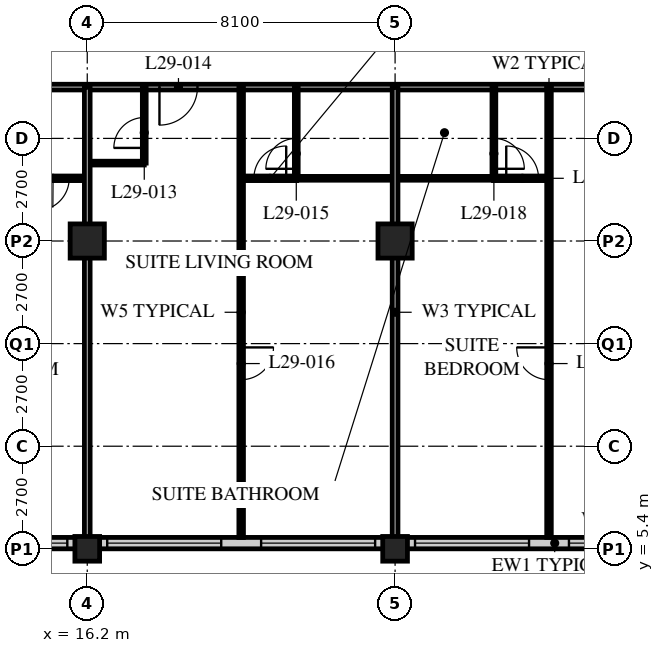
"""IFC4 building model, lengths in metres.
Left out: names, types, materials, properties, quantities, classifications, styles, units other than length and angle.
Written with IfcOpenShell. Run it as: python <this file> out.ifc"""

import sys

from ifc_helpers import new_model, si_unit, direction, frame, frame_2d, origin, origin_2d, place, context, subcontext, project, spatial, rectangle, hollow_rectangle, extrude, element, fill, save


model = new_model("IFC4")
c1 = context("Model", 3, precision=1e-05, world=origin(), true_north=direction((0.0, 1.0)))
c2 = subcontext(c1, "Body", "Model", "MODEL_VIEW")
j1 = project(units=[si_unit("LENGTHUNIT", "METRE"), si_unit("PLANEANGLEUNIT", "RADIAN")], contexts=[c1])
p1 = place(None, origin())
s1 = spatial("IfcSite", under=j1, at=p1, CompositionType="ELEMENT")
p2 = place(p1, origin())
s2 = spatial("IfcBuilding", under=s1, at=p2, CompositionType="ELEMENT")
p3 = place(p2, frame((0.0, 0.0, 117.0)))
s3 = spatial("IfcBuildingStorey", under=s2, at=p3, CompositionType="ELEMENT", Elevation=117.0)
p4 = place(p3, frame((16.2, 5.4, 0.0), z_axis=(0.0, 0.0, 1.0), x_axis=(1.0, 0.0, 0.0)))
e1 = element("IfcColumn", 1, at=p4, inside=s3, PredefinedType="COLUMN", context=c2, shape_type="SweptSolid", body=[
    extrude(hollow_rectangle(XDim=0.65, YDim=0.65, WallThickness=0.055, at=origin_2d()), origin(), (0.0, 0.0, 1.0), 3.4),
])
p5 = place(p3, frame((16.2, 13.5, 0.0), z_axis=(0.0, 0.0, 1.0), x_axis=(1.0, 0.0, 0.0)))
e2 = element("IfcColumn", 2, at=p5, inside=s3, PredefinedType="COLUMN", context=c2, shape_type="SweptSolid", body=[
    extrude(hollow_rectangle(XDim=0.9, YDim=0.9, WallThickness=0.09, at=origin_2d()), origin(), (0.0, 0.0, 1.0), 3.4),
])
p6 = place(p3, frame((24.3, 5.4, 0.0), z_axis=(0.0, 0.0, 1.0), x_axis=(1.0, 0.0, 0.0)))
e3 = element("IfcColumn", 3, at=p6, inside=s3, PredefinedType="COLUMN", context=c2, shape_type="SweptSolid", body=[
    extrude(hollow_rectangle(XDim=0.65, YDim=0.65, WallThickness=0.055, at=origin_2d()), origin(), (0.0, 0.0, 1.0), 3.4),
])
p7 = place(p3, frame((24.3, 13.5, 0.0), z_axis=(0.0, 0.0, 1.0), x_axis=(1.0, 0.0, 0.0)))
e4 = element("IfcColumn", 4, at=p7, inside=s3, PredefinedType="COLUMN", context=c2, shape_type="SweptSolid", body=[
    extrude(hollow_rectangle(XDim=0.9, YDim=0.9, WallThickness=0.09, at=origin_2d()), origin(), (0.0, 0.0, 1.0), 3.4),
])
p8 = place(p3, frame((8.4, 5.55, 0.0), z_axis=(0.0, 0.0, 1.0), x_axis=(1.0, 0.0, 0.0)))
e5 = element("IfcWall", 5, at=p8, inside=s3, PredefinedType="SOLIDWALL", context=c2, shape_type="SweptSolid", body=[
    extrude(rectangle(XDim=40.2, YDim=0.3, at=frame_2d((20.1, 0.0))), origin(), (0.0, 0.0, 1.0), 3.19),
])
p9 = place(p8, frame((0.225, 0.0, 0.9)))
e6 = element("IfcOpeningElement", 6, at=p9, cuts=e5, PredefinedType="OPENING", context=c2, shape_type="SweptSolid", body=[
    extrude(rectangle(XDim=3.0, YDim=2.0, at=frame_2d((1.5, 1.0))), frame((0.0, 0.16, 0.0), z_axis=(0.0, -1.0, 0.0), x_axis=(1.0, 0.0, 0.0)), (0.0, 0.0, 1.0), 0.32),
])
p10 = place(p8, frame((4.275, 0.0, 0.9)))
e7 = element("IfcOpeningElement", 7, at=p10, cuts=e5, PredefinedType="OPENING", context=c2, shape_type="SweptSolid", body=[
    extrude(rectangle(XDim=3.0, YDim=2.0, at=frame_2d((1.5, 1.0))), frame((0.0, 0.16, 0.0), z_axis=(0.0, -1.0, 0.0), x_axis=(1.0, 0.0, 0.0)), (0.0, 0.0, 1.0), 0.32),
])
p11 = place(p8, frame((8.325, 0.0, 0.9)))
e8 = element("IfcOpeningElement", 8, at=p11, cuts=e5, PredefinedType="OPENING", context=c2, shape_type="SweptSolid", body=[
    extrude(rectangle(XDim=3.0, YDim=2.0, at=frame_2d((1.5, 1.0))), frame((0.0, 0.16, 0.0), z_axis=(0.0, -1.0, 0.0), x_axis=(1.0, 0.0, 0.0)), (0.0, 0.0, 1.0), 0.32),
])
p12 = place(p8, frame((12.375, 0.0, 0.9)))
e9 = element("IfcOpeningElement", 9, at=p12, cuts=e5, PredefinedType="OPENING", context=c2, shape_type="SweptSolid", body=[
    extrude(rectangle(XDim=3.0, YDim=2.0, at=frame_2d((1.5, 1.0))), frame((0.0, 0.16, 0.0), z_axis=(0.0, -1.0, 0.0), x_axis=(1.0, 0.0, 0.0)), (0.0, 0.0, 1.0), 0.32),
])
p13 = place(p8, frame((16.425, 0.0, 0.9)))
e10 = element("IfcOpeningElement", 10, at=p13, cuts=e5, PredefinedType="OPENING", context=c2, shape_type="SweptSolid", body=[
    extrude(rectangle(XDim=3.0, YDim=2.0, at=frame_2d((1.5, 1.0))), frame((0.0, 0.16, 0.0), z_axis=(0.0, -1.0, 0.0), x_axis=(1.0, 0.0, 0.0)), (0.0, 0.0, 1.0), 0.32),
])
p14 = place(p8, frame((20.475, 0.0, 0.9)))
e11 = element("IfcOpeningElement", 11, at=p14, cuts=e5, PredefinedType="OPENING", context=c2, shape_type="SweptSolid", body=[
    extrude(rectangle(XDim=3.0, YDim=2.0, at=frame_2d((1.5, 1.0))), frame((0.0, 0.16, 0.0), z_axis=(0.0, -1.0, 0.0), x_axis=(1.0, 0.0, 0.0)), (0.0, 0.0, 1.0), 0.32),
])
p15 = place(p8, frame((24.525, 0.0, 0.9)))
e12 = element("IfcOpeningElement", 12, at=p15, cuts=e5, PredefinedType="OPENING", context=c2, shape_type="SweptSolid", body=[
    extrude(rectangle(XDim=3.0, YDim=2.0, at=frame_2d((1.5, 1.0))), frame((0.0, 0.16, 0.0), z_axis=(0.0, -1.0, 0.0), x_axis=(1.0, 0.0, 0.0)), (0.0, 0.0, 1.0), 0.32),
])
p16 = place(p8, frame((28.575, 0.0, 0.9)))
e13 = element("IfcOpeningElement", 13, at=p16, cuts=e5, PredefinedType="OPENING", context=c2, shape_type="SweptSolid", body=[
    extrude(rectangle(XDim=3.0, YDim=2.0, at=frame_2d((1.5, 1.0))), frame((0.0, 0.16, 0.0), z_axis=(0.0, -1.0, 0.0), x_axis=(1.0, 0.0, 0.0)), (0.0, 0.0, 1.0), 0.32),
])
p17 = place(p8, frame((32.625, 0.0, 0.9)))
e14 = element("IfcOpeningElement", 14, at=p17, cuts=e5, PredefinedType="OPENING", context=c2, shape_type="SweptSolid", body=[
    extrude(rectangle(XDim=3.0, YDim=2.0, at=frame_2d((1.5, 1.0))), frame((0.0, 0.16, 0.0), z_axis=(0.0, -1.0, 0.0), x_axis=(1.0, 0.0, 0.0)), (0.0, 0.0, 1.0), 0.32),
])
p18 = place(p8, frame((36.675, 0.0, 0.9)))
e15 = element("IfcOpeningElement", 15, at=p18, cuts=e5, PredefinedType="OPENING", context=c2, shape_type="SweptSolid", body=[
    extrude(rectangle(XDim=3.0, YDim=2.0, at=frame_2d((1.5, 1.0))), frame((0.0, 0.16, 0.0), z_axis=(0.0, -1.0, 0.0), x_axis=(1.0, 0.0, 0.0)), (0.0, 0.0, 1.0), 0.32),
])
p19 = place(p3, frame((12.15, 17.55, 0.0), z_axis=(0.0, 0.0, 1.0), x_axis=(1.0, 0.0, 0.0)))
e16 = element("IfcWall", 16, at=p19, inside=s3, PredefinedType="PARTITIONING", context=c2, shape_type="SweptSolid", body=[
    extrude(rectangle(XDim=32.4, YDim=0.15, at=frame_2d((16.2, 0.0))), origin(), (0.0, 0.0, 1.0), 3.19),
])
p20 = place(p19, frame((5.95, 0.0, 0.0)))
e17 = element("IfcOpeningElement", 17, at=p20, cuts=e16, PredefinedType="OPENING", context=c2, shape_type="SweptSolid", body=[
    extrude(rectangle(XDim=1.0, YDim=2.1, at=frame_2d((0.5, 1.05))), frame((0.0, 0.085, 0.0), z_axis=(0.0, -1.0, 0.0), x_axis=(1.0, 0.0, 0.0)), (0.0, 0.0, 1.0), 0.17),
])
p21 = place(p19, frame((17.725, 0.0, 0.0)))
e18 = element("IfcOpeningElement", 18, at=p21, cuts=e16, PredefinedType="OPENING", context=c2, shape_type="SweptSolid", body=[
    extrude(rectangle(XDim=1.0, YDim=2.1, at=frame_2d((0.5, 1.05))), frame((0.0, 0.085, 0.0), z_axis=(0.0, -1.0, 0.0), x_axis=(1.0, 0.0, 0.0)), (0.0, 0.0, 1.0), 0.17),
])
p22 = place(p19, frame((26.75, 0.0, 0.0)))
e19 = element("IfcOpeningElement", 19, at=p22, cuts=e16, PredefinedType="OPENING", context=c2, shape_type="SweptSolid", body=[
    extrude(rectangle(XDim=1.0, YDim=2.1, at=frame_2d((0.5, 1.05))), frame((0.0, 0.085, 0.0), z_axis=(0.0, -1.0, 0.0), x_axis=(1.0, 0.0, 0.0)), (0.0, 0.0, 1.0), 0.17),
])
p23 = place(p19, frame((1.525, 0.0, 0.0)))
e20 = element("IfcOpeningElement", 20, at=p23, cuts=e16, PredefinedType="OPENING", context=c2, shape_type="SweptSolid", body=[
    extrude(rectangle(XDim=1.0, YDim=2.1, at=frame_2d((0.5, 1.05))), frame((0.0, 0.085, 0.0), z_axis=(0.0, -1.0, 0.0), x_axis=(1.0, 0.0, 0.0)), (0.0, 0.0, 1.0), 0.17),
])
p24 = place(p19, frame((29.875, 0.0, 0.0)))
e21 = element("IfcOpeningElement", 21, at=p24, cuts=e16, PredefinedType="OPENING", context=c2, shape_type="SweptSolid", body=[
    extrude(rectangle(XDim=1.0, YDim=2.1, at=frame_2d((0.5, 1.05))), frame((0.0, 0.085, 0.0), z_axis=(0.0, -1.0, 0.0), x_axis=(1.0, 0.0, 0.0)), (0.0, 0.0, 1.0), 0.17),
])
p25 = place(p3, frame((16.2, 15.55, 0.0), z_axis=(0.0, 0.0, 1.0), x_axis=(1.0, 0.0, 0.0)))
e22 = element("IfcWall", 22, at=p25, inside=s3, PredefinedType="PARTITIONING", context=c2, shape_type="SweptSolid", body=[
    extrude(rectangle(XDim=1.5, YDim=0.1, at=frame_2d((0.75, 0.0))), origin(), (0.0, 0.0, 1.0), 3.19),
])
p26 = place(p3, frame((17.7, 17.55, 0.0), z_axis=(0.0, 0.0, 1.0), x_axis=(0.0, -1.0, 0.0)))
e23 = element("IfcWall", 23, at=p26, inside=s3, PredefinedType="PARTITIONING", context=c2, shape_type="SweptSolid", body=[
    extrude(rectangle(XDim=2.0, YDim=0.1, at=frame_2d((1.0, 0.0))), origin(), (0.0, 0.0, 1.0), 3.19),
])
p27 = place(p26, frame((0.8, 0.0, 0.0)))
e24 = element("IfcOpeningElement", 24, at=p27, cuts=e23, PredefinedType="OPENING", context=c2, shape_type="SweptSolid", body=[
    extrude(rectangle(XDim=0.8, YDim=2.1, at=frame_2d((0.4, 1.05))), frame((0.0, 0.06, 0.0), z_axis=(0.0, -1.0, 0.0), x_axis=(1.0, 0.0, 0.0)), (0.0, 0.0, 1.0), 0.12),
])
p28 = place(p3, frame((21.7, 15.15, 0.0), z_axis=(0.0, 0.0, 1.0), x_axis=(1.0, 0.0, 0.0)))
e25 = element("IfcWall", 25, at=p28, inside=s3, PredefinedType="PARTITIONING", context=c2, shape_type="SweptSolid", body=[
    extrude(rectangle(XDim=5.2, YDim=0.1, at=frame_2d((2.6, 0.0))), origin(), (0.0, 0.0, 1.0), 3.19),
])
p29 = place(p3, frame((21.7, 17.55, 0.0), z_axis=(0.0, 0.0, 1.0), x_axis=(0.0, -1.0, 0.0)))
e26 = element("IfcWall", 26, at=p29, inside=s3, PredefinedType="PARTITIONING", context=c2, shape_type="SweptSolid", body=[
    extrude(rectangle(XDim=2.4, YDim=0.1, at=frame_2d((1.2, 0.0))), origin(), (0.0, 0.0, 1.0), 3.19),
])
p30 = place(p29, frame((1.35, 0.0, 0.0)))
e27 = element("IfcOpeningElement", 27, at=p30, cuts=e26, PredefinedType="OPENING", context=c2, shape_type="SweptSolid", body=[
    extrude(rectangle(XDim=0.8, YDim=2.1, at=frame_2d((0.4, 1.05))), frame((0.0, 0.06, 0.0), z_axis=(0.0, -1.0, 0.0), x_axis=(1.0, 0.0, 0.0)), (0.0, 0.0, 1.0), 0.12),
])
p31 = place(p3, frame((20.25, 17.55, 0.0), z_axis=(0.0, 0.0, 1.0), x_axis=(0.0, -1.0, 0.0)))
e28 = element("IfcWall", 28, at=p31, inside=s3, PredefinedType="PARTITIONING", context=c2, shape_type="SweptSolid", body=[
    extrude(rectangle(XDim=11.85, YDim=0.12, at=frame_2d((5.925, 0.0))), origin(), (0.0, 0.0, 1.0), 3.19),
])
p32 = place(p31, frame((6.85, 0.0, 0.0)))
e29 = element("IfcOpeningElement", 29, at=p32, cuts=e28, PredefinedType="OPENING", context=c2, shape_type="SweptSolid", body=[
    extrude(rectangle(XDim=0.85, YDim=2.1, at=frame_2d((0.425, 1.05))), frame((0.0, 0.07, 0.0), z_axis=(0.0, -1.0, 0.0), x_axis=(1.0, 0.0, 0.0)), (0.0, 0.0, 1.0), 0.14),
])
p33 = place(p3, frame((24.3, 17.55, 0.0), z_axis=(0.0, 0.0, 1.0), x_axis=(0.0, -1.0, 0.0)))
e30 = element("IfcWall", 30, at=p33, inside=s3, PredefinedType="PARTITIONING", context=c2, shape_type="SweptSolid", body=[
    extrude(rectangle(XDim=11.85, YDim=0.15, at=frame_2d((5.925, 0.0))), origin(), (0.0, 0.0, 1.0), 2.578),
])
p34 = place(p3, frame((26.9, 17.55, 0.0), z_axis=(0.0, 0.0, 1.0), x_axis=(0.0, -1.0, 0.0)))
e31 = element("IfcWall", 31, at=p34, inside=s3, PredefinedType="PARTITIONING", context=c2, shape_type="SweptSolid", body=[
    extrude(rectangle(XDim=2.4, YDim=0.1, at=frame_2d((1.2, 0.0))), origin(), (0.0, 0.0, 1.0), 3.19),
])
p35 = place(p34, frame((1.35, 0.0, 0.0)))
e32 = element("IfcOpeningElement", 32, at=p35, cuts=e31, PredefinedType="OPENING", context=c2, shape_type="SweptSolid", body=[
    extrude(rectangle(XDim=0.8, YDim=2.1, at=frame_2d((0.4, 1.05))), frame((0.0, 0.06, 0.0), z_axis=(0.0, -1.0, 0.0), x_axis=(1.0, 0.0, 0.0)), (0.0, 0.0, 1.0), 0.12),
])
p36 = place(p3, frame((28.35, 17.55, 0.0), z_axis=(0.0, 0.0, 1.0), x_axis=(0.0, -1.0, 0.0)))
e33 = element("IfcWall", 33, at=p36, inside=s3, PredefinedType="PARTITIONING", context=c2, shape_type="SweptSolid", body=[
    extrude(rectangle(XDim=11.85, YDim=0.12, at=frame_2d((5.925, 0.0))), origin(), (0.0, 0.0, 1.0), 3.19),
])
p37 = place(p36, frame((6.85, 0.0, 0.0)))
e34 = element("IfcOpeningElement", 34, at=p37, cuts=e33, PredefinedType="OPENING", context=c2, shape_type="SweptSolid", body=[
    extrude(rectangle(XDim=0.85, YDim=2.1, at=frame_2d((0.425, 1.05))), frame((0.0, 0.07, 0.0), z_axis=(0.0, -1.0, 0.0), x_axis=(1.0, 0.0, 0.0)), (0.0, 0.0, 1.0), 0.14),
])
p38 = place(p3, frame((8.15, 15.15, 0.0), z_axis=(0.0, 0.0, 1.0), x_axis=(1.0, 0.0, 0.0)))
e35 = element("IfcWall", 35, at=p38, inside=s3, PredefinedType="PARTITIONING", context=c2, shape_type="SweptSolid", body=[
    extrude(rectangle(XDim=8.05, YDim=0.12, at=frame_2d((4.025, 0.0))), origin(), (0.0, 0.0, 1.0), 3.19),
])
p39 = place(p38, frame((6.725, 0.0, 0.0)))
e36 = element("IfcOpeningElement", 36, at=p39, cuts=e35, PredefinedType="OPENING", context=c2, shape_type="SweptSolid", body=[
    extrude(rectangle(XDim=0.85, YDim=2.1, at=frame_2d((0.425, 1.05))), frame((0.0, 0.07, 0.0), z_axis=(0.0, -1.0, 0.0), x_axis=(1.0, 0.0, 0.0)), (0.0, 0.0, 1.0), 0.14),
])
p40 = place(p38, frame((2.875, 0.0, 0.0)))
e37 = element("IfcOpeningElement", 37, at=p40, cuts=e35, PredefinedType="OPENING", context=c2, shape_type="SweptSolid", body=[
    extrude(rectangle(XDim=0.85, YDim=2.1, at=frame_2d((0.425, 1.05))), frame((0.0, 0.07, 0.0), z_axis=(0.0, -1.0, 0.0), x_axis=(1.0, 0.0, 0.0)), (0.0, 0.0, 1.0), 0.14),
])
p41 = place(p3, frame((16.2, 17.55, 0.0), z_axis=(0.0, 0.0, 1.0), x_axis=(0.0, -1.0, 0.0)))
e38 = element("IfcWall", 38, at=p41, inside=s3, PredefinedType="PARTITIONING", context=c2, shape_type="SweptSolid", body=[
    extrude(rectangle(XDim=11.85, YDim=0.15, at=frame_2d((5.925, 0.0))), origin(), (0.0, 0.0, 1.0), 2.578),
])
p42 = place(p3, frame((21.71, 15.15, 0.0), z_axis=(0.0, 0.0, 1.0), x_axis=(-1.0, 0.0, 0.0)))
e39 = element("IfcWall", 39, at=p42, inside=s3, PredefinedType="PARTITIONING", context=c2, shape_type="SweptSolid", body=[
    extrude(rectangle(XDim=1.46, YDim=0.12, at=frame_2d((0.73, 0.0))), origin(), (0.0, 0.0, 1.0), 3.19),
])
p43 = place(p42, frame((0.275, 0.0, 0.0)))
e40 = element("IfcOpeningElement", 40, at=p43, cuts=e39, PredefinedType="OPENING", context=c2, shape_type="SweptSolid", body=[
    extrude(rectangle(XDim=0.85, YDim=2.1, at=frame_2d((0.425, 1.05))), frame((0.0, 0.07, 0.0), z_axis=(0.0, -1.0, 0.0), x_axis=(1.0, 0.0, 0.0)), (0.0, 0.0, 1.0), 0.14),
])
p44 = place(p3, frame((28.35, 15.15, 0.0), z_axis=(0.0, 0.0, 1.0), x_axis=(-1.0, 0.0, 0.0)))
e41 = element("IfcWall", 41, at=p44, inside=s3, PredefinedType="PARTITIONING", context=c2, shape_type="SweptSolid", body=[
    extrude(rectangle(XDim=1.46, YDim=0.12, at=frame_2d((0.73, 0.0))), origin(), (0.0, 0.0, 1.0), 3.19),
])
p45 = place(p44, frame((0.275, 0.0, 0.0)))
e42 = element("IfcOpeningElement", 42, at=p45, cuts=e41, PredefinedType="OPENING", context=c2, shape_type="SweptSolid", body=[
    extrude(rectangle(XDim=0.85, YDim=2.1, at=frame_2d((0.425, 1.05))), frame((0.0, 0.07, 0.0), z_axis=(0.0, -1.0, 0.0), x_axis=(1.0, 0.0, 0.0)), (0.0, 0.0, 1.0), 0.14),
])
p46 = place(p10, origin())
e43 = element("IfcWindow", 43, at=p46, inside=s3, PartitioningType="SINGLE_PANEL", PredefinedType="WINDOW", context=c2, shape_type="SweptSolid", body=[
    extrude(rectangle(XDim=3.0, YDim=2.0, at=frame_2d((1.5, 1.0))), frame((0.0, 0.03, 0.0), z_axis=(0.0, -1.0, 0.0), x_axis=(1.0, 0.0, 0.0)), (0.0, 0.0, 1.0), 0.06),
])
fill(e7, e43)
p47 = place(p11, origin())
e44 = element("IfcWindow", 44, at=p47, inside=s3, PartitioningType="SINGLE_PANEL", PredefinedType="WINDOW", context=c2, shape_type="SweptSolid", body=[
    extrude(rectangle(XDim=3.0, YDim=2.0, at=frame_2d((1.5, 1.0))), frame((0.0, 0.03, 0.0), z_axis=(0.0, -1.0, 0.0), x_axis=(1.0, 0.0, 0.0)), (0.0, 0.0, 1.0), 0.06),
])
fill(e8, e44)
p48 = place(p12, origin())
e45 = element("IfcWindow", 45, at=p48, inside=s3, PartitioningType="SINGLE_PANEL", PredefinedType="WINDOW", context=c2, shape_type="SweptSolid", body=[
    extrude(rectangle(XDim=3.0, YDim=2.0, at=frame_2d((1.5, 1.0))), frame((0.0, 0.03, 0.0), z_axis=(0.0, -1.0, 0.0), x_axis=(1.0, 0.0, 0.0)), (0.0, 0.0, 1.0), 0.06),
])
fill(e9, e45)
p49 = place(p13, origin())
e46 = element("IfcWindow", 46, at=p49, inside=s3, PartitioningType="SINGLE_PANEL", PredefinedType="WINDOW", context=c2, shape_type="SweptSolid", body=[
    extrude(rectangle(XDim=3.0, YDim=2.0, at=frame_2d((1.5, 1.0))), frame((0.0, 0.03, 0.0), z_axis=(0.0, -1.0, 0.0), x_axis=(1.0, 0.0, 0.0)), (0.0, 0.0, 1.0), 0.06),
])
fill(e10, e46)
p50 = place(p14, origin())
e47 = element("IfcWindow", 47, at=p50, inside=s3, PartitioningType="SINGLE_PANEL", PredefinedType="WINDOW", context=c2, shape_type="SweptSolid", body=[
    extrude(rectangle(XDim=3.0, YDim=2.0, at=frame_2d((1.5, 1.0))), frame((0.0, 0.03, 0.0), z_axis=(0.0, -1.0, 0.0), x_axis=(1.0, 0.0, 0.0)), (0.0, 0.0, 1.0), 0.06),
])
fill(e11, e47)
p51 = place(p27, origin())
e48 = element("IfcDoor", 48, at=p51, inside=s3, OperationType="SINGLE_SWING_LEFT", PredefinedType="DOOR", context=c2, shape_type="SweptSolid", body=[
    extrude(rectangle(XDim=0.8, YDim=2.1, at=frame_2d((0.4, 1.05))), frame((0.0, 0.025, 0.0), z_axis=(0.0, -1.0, 0.0), x_axis=(1.0, 0.0, 0.0)), (0.0, 0.0, 1.0), 0.05),
])
fill(e24, e48)
p52 = place(p20, origin())
e49 = element("IfcDoor", 49, at=p52, inside=s3, OperationType="SINGLE_SWING_RIGHT", PredefinedType="DOOR", context=c2, shape_type="SweptSolid", body=[
    extrude(rectangle(XDim=1.0, YDim=2.1, at=frame_2d((0.5, 1.05))), frame((0.0, 0.025, 0.0), z_axis=(0.0, -1.0, 0.0), x_axis=(1.0, 0.0, 0.0)), (0.0, 0.0, 1.0), 0.05),
])
fill(e17, e49)
p53 = place(p30, origin())
e50 = element("IfcDoor", 50, at=p53, inside=s3, OperationType="SINGLE_SWING_LEFT", PredefinedType="DOOR", context=c2, shape_type="SweptSolid", body=[
    extrude(rectangle(XDim=0.8, YDim=2.1, at=frame_2d((0.4, 1.05))), frame((0.0, 0.025, 0.0), z_axis=(0.0, -1.0, 0.0), x_axis=(1.0, 0.0, 0.0)), (0.0, 0.0, 1.0), 0.05),
])
fill(e27, e50)
p54 = place(p32, origin())
e51 = element("IfcDoor", 51, at=p54, inside=s3, OperationType="SINGLE_SWING_LEFT", PredefinedType="DOOR", context=c2, shape_type="SweptSolid", body=[
    extrude(rectangle(XDim=0.85, YDim=2.1, at=frame_2d((0.425, 1.05))), frame((0.0, 0.025, 0.0), z_axis=(0.0, -1.0, 0.0), x_axis=(1.0, 0.0, 0.0)), (0.0, 0.0, 1.0), 0.05),
])
fill(e29, e51)
p55 = place(p35, origin())
e52 = element("IfcDoor", 52, at=p55, inside=s3, OperationType="SINGLE_SWING_RIGHT", PredefinedType="DOOR", context=c2, shape_type="SweptSolid", body=[
    extrude(rectangle(XDim=0.8, YDim=2.1, at=frame_2d((0.4, 1.05))), frame((0.0, 0.025, 0.0), z_axis=(0.0, -1.0, 0.0), x_axis=(1.0, 0.0, 0.0)), (0.0, 0.0, 1.0), 0.05),
])
fill(e32, e52)
p56 = place(p37, origin())
e53 = element("IfcDoor", 53, at=p56, inside=s3, OperationType="SINGLE_SWING_RIGHT", PredefinedType="DOOR", context=c2, shape_type="SweptSolid", body=[
    extrude(rectangle(XDim=0.85, YDim=2.1, at=frame_2d((0.425, 1.05))), frame((0.0, 0.025, 0.0), z_axis=(0.0, -1.0, 0.0), x_axis=(1.0, 0.0, 0.0)), (0.0, 0.0, 1.0), 0.05),
])
fill(e34, e53)
p57 = place(p39, origin())
e54 = element("IfcDoor", 54, at=p57, inside=s3, OperationType="SINGLE_SWING_RIGHT", PredefinedType="DOOR", context=c2, shape_type="SweptSolid", body=[
    extrude(rectangle(XDim=0.85, YDim=2.1, at=frame_2d((0.425, 1.05))), frame((0.0, 0.025, 0.0), z_axis=(0.0, -1.0, 0.0), x_axis=(1.0, 0.0, 0.0)), (0.0, 0.0, 1.0), 0.05),
])
fill(e36, e54)
p58 = place(p43, origin())
e55 = element("IfcDoor", 55, at=p58, inside=s3, OperationType="SINGLE_SWING_RIGHT", PredefinedType="DOOR", context=c2, shape_type="SweptSolid", body=[
    extrude(rectangle(XDim=0.85, YDim=2.1, at=frame_2d((0.425, 1.05))), frame((0.0, 0.025, 0.0), z_axis=(0.0, -1.0, 0.0), x_axis=(1.0, 0.0, 0.0)), (0.0, 0.0, 1.0), 0.05),
])
fill(e40, e55)
p59 = place(p45, origin())
e56 = element("IfcDoor", 56, at=p59, inside=s3, OperationType="SINGLE_SWING_LEFT", PredefinedType="DOOR", context=c2, shape_type="SweptSolid", body=[
    extrude(rectangle(XDim=0.85, YDim=2.1, at=frame_2d((0.425, 1.05))), frame((0.0, 0.025, 0.0), z_axis=(0.0, -1.0, 0.0), x_axis=(1.0, 0.0, 0.0)), (0.0, 0.0, 1.0), 0.05),
])
fill(e42, e56)
save(model, sys.argv[1])
